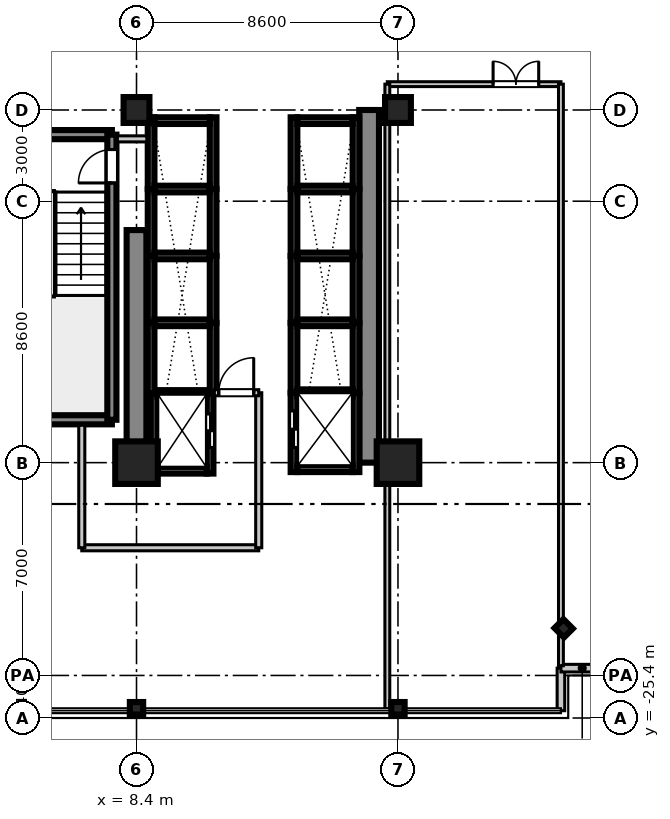
"""IFC4 building model, lengths in metres.
Left out: names, types, materials, properties, quantities, classifications, styles, units other than length and angle.
Written with IfcOpenShell. Run it as: python <this file> out.ifc"""

import sys

from ifc_helpers import new_model, si_unit, direction, frame, frame_2d, origin, origin_2d, place, context, subcontext, project, spatial, rectangle, i_section, extrude, source, transform, mapped, element, fill, save


model = new_model("IFC4")
c1 = context("Model", 3, precision=1e-05, world=origin(), true_north=direction((0.0, 1.0)))
c2 = subcontext(c1, "Body", "Model", "MODEL_VIEW")
j1 = project(units=[si_unit("LENGTHUNIT", "METRE"), si_unit("PLANEANGLEUNIT", "RADIAN")], contexts=[c1])
p1 = place(None, origin())
s1 = spatial("IfcSite", under=j1, at=p1, CompositionType="ELEMENT")
p2 = place(p1, origin())
s2 = spatial("IfcBuilding", under=s1, at=p2, CompositionType="ELEMENT")
p3 = place(p2, frame((0.0, 0.0, 68.9)))
s3 = spatial("IfcBuildingStorey", under=s2, at=p3, CompositionType="ELEMENT", Elevation=68.9)
m1 = source(origin(), c2, "Body", "SweptSolid", [
    extrude(rectangle(XDim=1.4, YDim=1.4, at=origin_2d()), origin(), (0.0, 0.0, 1.0), 3.605),
])
p4 = place(p3, frame((8.4, -17.0, 0.0), z_axis=(0.0, 0.0, 1.0), x_axis=(1.0, 0.0, 0.0)))
e1 = element("IfcColumn", 1, at=p4, inside=s3, PredefinedType="COLUMN", context=c2, shape_type="MappedRepresentation", body=[
    mapped(m1, transform((0.0, 0.0, 0.0), scale=1.0)),
])
m2 = source(origin(), c2, "Body", "SweptSolid", [
    extrude(rectangle(XDim=0.85, YDim=0.85, at=origin_2d()), origin(), (0.0, 0.0, 1.0), 3.605),
])
p5 = place(p3, frame((8.4, -5.4, 0.0), z_axis=(0.0, 0.0, 1.0), x_axis=(1.0, 0.0, 0.0)))
e2 = element("IfcColumn", 2, at=p5, inside=s3, PredefinedType="PILASTER", context=c2, shape_type="MappedRepresentation", body=[
    mapped(m2, transform((0.0, 0.0, 0.0), scale=1.0)),
])
p6 = place(p3, frame((17.0, -17.0, 0.0), z_axis=(0.0, 0.0, 1.0), x_axis=(1.0, 0.0, 0.0)))
e3 = element("IfcColumn", 3, at=p6, inside=s3, PredefinedType="COLUMN", context=c2, shape_type="MappedRepresentation", body=[
    mapped(m1, transform((0.0, 0.0, 0.0), scale=1.0)),
])
p7 = place(p3, frame((17.0, -5.4, 0.0), z_axis=(0.0, 0.0, 1.0), x_axis=(1.0, 0.0, 0.0)))
e4 = element("IfcColumn", 4, at=p7, inside=s3, PredefinedType="PILASTER", context=c2, shape_type="MappedRepresentation", body=[
    mapped(m2, transform((0.0, 0.0, 0.0), scale=1.0)),
])
m3 = source(origin(), c2, "Body", "SweptSolid", [
    extrude(i_section(OverallWidth=0.412, OverallDepth=0.438, WebThickness=0.023, FlangeThickness=0.036, at=origin_2d()), origin(), (0.0, 0.0, 1.0), 3.605),
])
for number, where, z_axis, x_axis in (
    (5, (8.4, -25.08, 0.0), (0.0, 0.0, 1.0), (0.0, 1.0, 0.0)),
    (6, (17.0, -25.08, 0.0), (0.0, 0.0, 1.0), (0.0, 1.0, 0.0)),
    (7, (22.45, -22.45, 0.0), (0.0, 0.0, 1.0), (0.707, 0.707, 0.0)),
):
    element("IfcColumn", number, at=place(p3, frame(where, z_axis=z_axis, x_axis=x_axis)), inside=s3, PredefinedType="COLUMN", context=c2, shape_type="MappedRepresentation", body=[
        mapped(m3, transform((0.0, 0.0, 0.0), scale=1.0)),
    ])
m4 = source(origin(), c2, "Body", "SweptSolid", [
    extrude(rectangle(XDim=7.65, YDim=0.65, at=frame_2d((3.825, 0.0))), origin(), (0.0, 0.0, 1.0), 3.37),
])
p8 = place(p3, frame((8.4, -17.0, 0.0), z_axis=(0.0, 0.0, 1.0), x_axis=(0.0, 1.0, 0.0)))
e8 = element("IfcWall", 8, at=p8, inside=s3, PredefinedType="SHEAR", context=c2, shape_type="MappedRepresentation", body=[
    mapped(m4, transform((0.0, 0.0, 0.0), scale=1.0)),
])
m5 = source(origin(), c2, "Body", "SweptSolid", [
    extrude(rectangle(XDim=11.6, YDim=0.65, at=frame_2d((5.8, 0.0))), origin(), (0.0, 0.0, 1.0), 3.37),
])
p9 = place(p3, frame((16.05, -17.0, 0.0), z_axis=(0.0, 0.0, 1.0), x_axis=(0.0, 1.0, 0.0)))
e9 = element("IfcWall", 9, at=p9, inside=s3, PredefinedType="SHEAR", context=c2, shape_type="MappedRepresentation", body=[
    mapped(m5, transform((0.0, 0.0, 0.0), scale=1.0)),
])
m6 = source(origin(), c2, "Body", "SweptSolid", [
    extrude(rectangle(XDim=3.98, YDim=0.3, at=frame_2d((1.99, 0.0))), origin(), (0.0, 0.0, 1.0), 3.37),
])
for number, where, z_axis, x_axis in (
    (10, (3.61, -15.59, 0.0), (0.0, 0.0, 1.0), (1.0, 0.0, 0.0)),
    (11, (3.61, -6.21, 0.0), (0.0, 0.0, 1.0), (1.0, 0.0, 0.0)),
):
    element("IfcWall", number, at=place(p3, frame(where, z_axis=z_axis, x_axis=x_axis)), inside=s3, PredefinedType="SHEAR", context=c2, shape_type="MappedRepresentation", body=[
        mapped(m6, transform((0.0, 0.0, 0.0), scale=1.0)),
    ])
m7 = source(origin(), c2, "Body", "SweptSolid", [
    extrude(rectangle(XDim=9.38, YDim=0.3, at=frame_2d((4.69, 0.0))), origin(), (0.0, 0.0, 1.0), 3.37),
])
p10 = place(p3, frame((7.59, -15.59, 0.0), z_axis=(0.0, 0.0, 1.0), x_axis=(0.0, 1.0, 0.0)))
e12 = element("IfcWall", 12, at=p10, inside=s3, PredefinedType="SHEAR", context=c2, shape_type="MappedRepresentation", body=[
    mapped(m7, transform((0.0, 0.0, 0.0), scale=1.0)),
])
p11 = place(p10, frame((7.79, 0.0, 0.0)))
e13 = element("IfcOpeningElement", 13, at=p11, cuts=e12, PredefinedType="OPENING", context=c2, shape_type="SweptSolid", body=[
    extrude(rectangle(XDim=1.1, YDim=2.15, at=frame_2d((0.55, 1.075))), frame((0.0, 0.16, 0.0), z_axis=(0.0, -1.0, 0.0), x_axis=(1.0, 0.0, 0.0)), (0.0, 0.0, 1.0), 0.32),
])
m8 = source(origin(), c2, "Body", "SweptSolid", [
    extrude(rectangle(XDim=2.36, YDim=0.22, at=frame_2d((1.18, 0.0))), origin(), (0.0, 0.0, 1.0), 3.37),
])
for number, where, z_axis, x_axis in (
    (14, (13.58, -8.0, 0.0), (0.0, 0.0, 1.0), (0.0, 1.0, 0.0)),
    (15, (15.62, -8.0, 0.0), (0.0, 0.0, 1.0), (0.0, 1.0, 0.0)),
):
    element("IfcWall", number, at=place(p3, frame(where, z_axis=z_axis, x_axis=x_axis)), inside=s3, PredefinedType="SHEAR", context=c2, shape_type="MappedRepresentation", body=[
        mapped(m8, transform((0.0, 0.0, 0.0), scale=1.0)),
    ])
m9 = source(origin(), c2, "Body", "SweptSolid", [
    extrude(rectangle(XDim=1.82, YDim=0.22, at=frame_2d((0.91, 0.0))), origin(), (0.0, 0.0, 1.0), 3.37),
])
p12 = place(p3, frame((13.69, -5.75, 0.0), z_axis=(0.0, 0.0, 1.0), x_axis=(1.0, 0.0, 0.0)))
e16 = element("IfcWall", 16, at=p12, inside=s3, PredefinedType="SHEAR", context=c2, shape_type="MappedRepresentation", body=[
    mapped(m9, transform((0.0, 0.0, 0.0), scale=1.0)),
])
m10 = source(origin(), c2, "Body", "SweptSolid", [
    extrude(rectangle(XDim=2.2, YDim=0.22, at=frame_2d((1.1, 0.0))), origin(), (0.0, 0.0, 1.0), 3.37),
])
for number, where, z_axis, x_axis in (
    (17, (13.58, -10.2, 0.0), (0.0, 0.0, 1.0), (0.0, 1.0, 0.0)),
    (18, (15.62, -10.2, 0.0), (0.0, 0.0, 1.0), (0.0, 1.0, 0.0)),
):
    element("IfcWall", number, at=place(p3, frame(where, z_axis=z_axis, x_axis=x_axis)), inside=s3, PredefinedType="SHEAR", context=c2, shape_type="MappedRepresentation", body=[
        mapped(m10, transform((0.0, 0.0, 0.0), scale=1.0)),
    ])
m11 = source(origin(), c2, "Body", "SweptSolid", [
    extrude(rectangle(XDim=1.82, YDim=0.22, at=frame_2d((0.91, 0.0))), origin(), (0.0, 0.0, 1.0), 3.65),
])
p13 = place(p3, frame((13.69, -8.0, 0.0), z_axis=(0.0, 0.0, 1.0), x_axis=(1.0, 0.0, 0.0)))
e19 = element("IfcWall", 19, at=p13, inside=s3, PredefinedType="SHEAR", context=c2, shape_type="MappedRepresentation", body=[
    mapped(m11, transform((0.0, 0.0, 0.0), scale=1.0)),
])
for number, where, z_axis, x_axis in (
    (20, (13.58, -12.4, 0.0), (0.0, 0.0, 1.0), (0.0, 1.0, 0.0)),
    (21, (15.62, -12.4, 0.0), (0.0, 0.0, 1.0), (0.0, 1.0, 0.0)),
):
    element("IfcWall", number, at=place(p3, frame(where, z_axis=z_axis, x_axis=x_axis)), inside=s3, PredefinedType="SHEAR", context=c2, shape_type="MappedRepresentation", body=[
        mapped(m10, transform((0.0, 0.0, 0.0), scale=1.0)),
    ])
p14 = place(p3, frame((13.69, -10.2, 0.0), z_axis=(0.0, 0.0, 1.0), x_axis=(1.0, 0.0, 0.0)))
e22 = element("IfcWall", 22, at=p14, inside=s3, PredefinedType="SHEAR", context=c2, shape_type="MappedRepresentation", body=[
    mapped(m11, transform((0.0, 0.0, 0.0), scale=1.0)),
])
m12 = source(origin(), c2, "Body", "SweptSolid", [
    extrude(rectangle(XDim=2.3, YDim=0.22, at=frame_2d((1.15, 0.0))), origin(), (0.0, 0.0, 1.0), 3.37),
])
for number, where, z_axis, x_axis in (
    (23, (13.58, -14.7, 0.0), (0.0, 0.0, 1.0), (0.0, 1.0, 0.0)),
    (24, (15.62, -14.7, 0.0), (0.0, 0.0, 1.0), (0.0, 1.0, 0.0)),
):
    element("IfcWall", number, at=place(p3, frame(where, z_axis=z_axis, x_axis=x_axis)), inside=s3, PredefinedType="SHEAR", context=c2, shape_type="MappedRepresentation", body=[
        mapped(m12, transform((0.0, 0.0, 0.0), scale=1.0)),
    ])
p15 = place(p3, frame((13.69, -12.4, 0.0), z_axis=(0.0, 0.0, 1.0), x_axis=(1.0, 0.0, 0.0)))
e25 = element("IfcWall", 25, at=p15, inside=s3, PredefinedType="SHEAR", context=c2, shape_type="MappedRepresentation", body=[
    mapped(m11, transform((0.0, 0.0, 0.0), scale=1.0)),
])
for number, where, z_axis, x_axis in (
    (26, (8.88, -8.0, 0.0), (0.0, 0.0, 1.0), (0.0, 1.0, 0.0)),
    (27, (10.92, -8.0, 0.0), (0.0, 0.0, 1.0), (0.0, 1.0, 0.0)),
):
    element("IfcWall", number, at=place(p3, frame(where, z_axis=z_axis, x_axis=x_axis)), inside=s3, PredefinedType="SHEAR", context=c2, shape_type="MappedRepresentation", body=[
        mapped(m8, transform((0.0, 0.0, 0.0), scale=1.0)),
    ])
p16 = place(p3, frame((8.99, -5.75, 0.0), z_axis=(0.0, 0.0, 1.0), x_axis=(1.0, 0.0, 0.0)))
e28 = element("IfcWall", 28, at=p16, inside=s3, PredefinedType="SHEAR", context=c2, shape_type="MappedRepresentation", body=[
    mapped(m9, transform((0.0, 0.0, 0.0), scale=1.0)),
])
for number, where, z_axis, x_axis in (
    (29, (8.88, -10.2, 0.0), (0.0, 0.0, 1.0), (0.0, 1.0, 0.0)),
    (30, (10.92, -10.2, 0.0), (0.0, 0.0, 1.0), (0.0, 1.0, 0.0)),
):
    element("IfcWall", number, at=place(p3, frame(where, z_axis=z_axis, x_axis=x_axis)), inside=s3, PredefinedType="SHEAR", context=c2, shape_type="MappedRepresentation", body=[
        mapped(m10, transform((0.0, 0.0, 0.0), scale=1.0)),
    ])
p17 = place(p3, frame((8.99, -8.0, 0.0), z_axis=(0.0, 0.0, 1.0), x_axis=(1.0, 0.0, 0.0)))
e31 = element("IfcWall", 31, at=p17, inside=s3, PredefinedType="SHEAR", context=c2, shape_type="MappedRepresentation", body=[
    mapped(m11, transform((0.0, 0.0, 0.0), scale=1.0)),
])
for number, where, z_axis, x_axis in (
    (32, (8.88, -12.4, 0.0), (0.0, 0.0, 1.0), (0.0, 1.0, 0.0)),
    (33, (10.92, -12.4, 0.0), (0.0, 0.0, 1.0), (0.0, 1.0, 0.0)),
):
    element("IfcWall", number, at=place(p3, frame(where, z_axis=z_axis, x_axis=x_axis)), inside=s3, PredefinedType="SHEAR", context=c2, shape_type="MappedRepresentation", body=[
        mapped(m10, transform((0.0, 0.0, 0.0), scale=1.0)),
    ])
p18 = place(p3, frame((8.99, -10.2, 0.0), z_axis=(0.0, 0.0, 1.0), x_axis=(1.0, 0.0, 0.0)))
e34 = element("IfcWall", 34, at=p18, inside=s3, PredefinedType="SHEAR", context=c2, shape_type="MappedRepresentation", body=[
    mapped(m11, transform((0.0, 0.0, 0.0), scale=1.0)),
])
m13 = source(origin(), c2, "Body", "SweptSolid", [
    extrude(rectangle(XDim=2.325, YDim=0.22, at=frame_2d((1.163, 0.0))), origin(), (0.0, 0.0, 1.0), 3.37),
])
for number, where, z_axis, x_axis in (
    (35, (8.88, -14.725, 0.0), (0.0, 0.0, 1.0), (0.0, 1.0, 0.0)),
    (36, (10.92, -14.725, 0.0), (0.0, 0.0, 1.0), (0.0, 1.0, 0.0)),
):
    element("IfcWall", number, at=place(p3, frame(where, z_axis=z_axis, x_axis=x_axis)), inside=s3, PredefinedType="SHEAR", context=c2, shape_type="MappedRepresentation", body=[
        mapped(m13, transform((0.0, 0.0, 0.0), scale=1.0)),
    ])
p19 = place(p3, frame((8.99, -12.4, 0.0), z_axis=(0.0, 0.0, 1.0), x_axis=(1.0, 0.0, 0.0)))
e37 = element("IfcWall", 37, at=p19, inside=s3, PredefinedType="SHEAR", context=c2, shape_type="MappedRepresentation", body=[
    mapped(m11, transform((0.0, 0.0, 0.0), scale=1.0)),
])
m14 = source(origin(), c2, "Body", "SweptSolid", [
    extrude(rectangle(XDim=2.635, YDim=0.22, at=frame_2d((1.317, 0.0))), origin(), (0.0, 0.0, 1.0), 3.37),
])
p20 = place(p3, frame((8.98, -17.36, 0.0), z_axis=(0.0, 0.0, 1.0), x_axis=(0.0, 1.0, 0.0)))
e38 = element("IfcWall", 38, at=p20, inside=s3, PredefinedType="SHEAR", context=c2, shape_type="MappedRepresentation", body=[
    mapped(m14, transform((0.0, 0.0, 0.0), scale=1.0)),
])
p21 = place(p3, frame((10.82, -17.36, 0.0), z_axis=(0.0, 0.0, 1.0), x_axis=(0.0, 1.0, 0.0)))
e39 = element("IfcWall", 39, at=p21, inside=s3, PredefinedType="SHEAR", context=c2, shape_type="MappedRepresentation", body=[
    mapped(m14, transform((0.0, 0.0, 0.0), scale=1.0)),
])
p22 = place(p21, frame((0.86, 0.0, 0.0)))
e40 = element("IfcOpeningElement", 40, at=p22, cuts=e39, PredefinedType="OPENING", context=c2, shape_type="SweptSolid", body=[
    extrude(rectangle(XDim=1.1, YDim=2.2, at=frame_2d((0.55, 1.1))), frame((0.0, 0.12, 0.0), z_axis=(0.0, -1.0, 0.0), x_axis=(1.0, 0.0, 0.0)), (0.0, 0.0, 1.0), 0.24),
])
m15 = source(origin(), c2, "Body", "SweptSolid", [
    extrude(rectangle(XDim=1.62, YDim=0.22, at=frame_2d((0.81, 0.0))), origin(), (0.0, 0.0, 1.0), 3.37),
])
p23 = place(p3, frame((9.09, -17.25, 0.0), z_axis=(0.0, 0.0, 1.0), x_axis=(1.0, 0.0, 0.0)))
e41 = element("IfcWall", 41, at=p23, inside=s3, PredefinedType="SHEAR", context=c2, shape_type="MappedRepresentation", body=[
    mapped(m15, transform((0.0, 0.0, 0.0), scale=1.0)),
])
m16 = source(origin(), c2, "Body", "SweptSolid", [
    extrude(rectangle(XDim=1.62, YDim=0.22, at=frame_2d((0.81, 0.0))), origin(), (0.0, 0.0, 1.0), 3.65),
])
p24 = place(p3, frame((9.09, -14.725, 0.0), z_axis=(0.0, 0.0, 1.0), x_axis=(1.0, 0.0, 0.0)))
e42 = element("IfcWall", 42, at=p24, inside=s3, PredefinedType="SHEAR", context=c2, shape_type="MappedRepresentation", body=[
    mapped(m16, transform((0.0, 0.0, 0.0), scale=1.0)),
])
m17 = source(origin(), c2, "Body", "SweptSolid", [
    extrude(rectangle(XDim=2.61, YDim=0.22, at=frame_2d((1.305, 0.0))), origin(), (0.0, 0.0, 1.0), 3.37),
])
p25 = place(p3, frame((13.58, -17.31, 0.0), z_axis=(0.0, 0.0, 1.0), x_axis=(0.0, 1.0, 0.0)))
e43 = element("IfcWall", 43, at=p25, inside=s3, PredefinedType="SHEAR", context=c2, shape_type="MappedRepresentation", body=[
    mapped(m17, transform((0.0, 0.0, 0.0), scale=1.0)),
])
p26 = place(p25, frame((0.81, 0.0, 0.0)))
e44 = element("IfcOpeningElement", 44, at=p26, cuts=e43, PredefinedType="OPENING", context=c2, shape_type="SweptSolid", body=[
    extrude(rectangle(XDim=1.2, YDim=2.2, at=frame_2d((0.6, 1.1))), frame((0.0, 0.12, 0.0), z_axis=(0.0, -1.0, 0.0), x_axis=(1.0, 0.0, 0.0)), (0.0, 0.0, 1.0), 0.24),
])
p27 = place(p3, frame((15.62, -17.31, 0.0), z_axis=(0.0, 0.0, 1.0), x_axis=(0.0, 1.0, 0.0)))
e45 = element("IfcWall", 45, at=p27, inside=s3, PredefinedType="SHEAR", context=c2, shape_type="MappedRepresentation", body=[
    mapped(m17, transform((0.0, 0.0, 0.0), scale=1.0)),
])
p28 = place(p3, frame((13.69, -17.2, 0.0), z_axis=(0.0, 0.0, 1.0), x_axis=(1.0, 0.0, 0.0)))
e46 = element("IfcWall", 46, at=p28, inside=s3, PredefinedType="SHEAR", context=c2, shape_type="MappedRepresentation", body=[
    mapped(m9, transform((0.0, 0.0, 0.0), scale=1.0)),
])
p29 = place(p3, frame((13.69, -14.7, 0.0), z_axis=(0.0, 0.0, 1.0), x_axis=(1.0, 0.0, 0.0)))
e47 = element("IfcWall", 47, at=p29, inside=s3, PredefinedType="SHEAR", context=c2, shape_type="MappedRepresentation", body=[
    mapped(m11, transform((0.0, 0.0, 0.0), scale=1.0)),
])
m18 = source(origin(), c2, "Body", "SweptSolid", [
    extrude(rectangle(XDim=1.4, YDim=0.25, at=frame_2d((0.7, 0.0))), origin(), (0.0, 0.0, 1.0), 3.37),
])
for number, where, z_axis, x_axis in (
    (48, (22.36, -25.16, 0.0), (0.0, 0.0, 1.0), (0.0, 1.0, 0.0)),
    (49, (22.36, -23.76, 0.0), (0.0, 0.0, 1.0), (1.0, 0.0, 0.0)),
):
    element("IfcWall", number, at=place(p3, frame(where, z_axis=z_axis, x_axis=x_axis)), inside=s3, PredefinedType="STANDARD", context=c2, shape_type="MappedRepresentation", body=[
        mapped(m18, transform((0.0, 0.0, 0.0), scale=1.0)),
    ])
m19 = source(origin(), c2, "Body", "SweptSolid", [
    extrude(rectangle(XDim=5.82, YDim=0.2, at=frame_2d((2.91, 0.0))), origin(), (0.0, 0.0, 1.0), 2.71),
])
p30 = place(p3, frame((6.6, -19.8, 0.0), z_axis=(0.0, 0.0, 1.0), x_axis=(1.0, 0.0, 0.0)))
e50 = element("IfcWall", 50, at=p30, inside=s3, PredefinedType="PARTITIONING", context=c2, shape_type="MappedRepresentation", body=[
    mapped(m19, transform((0.0, 0.0, 0.0), scale=1.0)),
])
m20 = source(origin(), c2, "Body", "SweptSolid", [
    extrude(rectangle(XDim=4.03, YDim=0.2, at=frame_2d((2.015, 0.0))), origin(), (0.0, 0.0, 1.0), 2.71),
])
p31 = place(p3, frame((6.6, -19.8, 0.0), z_axis=(0.0, 0.0, 1.0), x_axis=(0.0, 1.0, 0.0)))
e51 = element("IfcWall", 51, at=p31, inside=s3, PredefinedType="PARTITIONING", context=c2, shape_type="MappedRepresentation", body=[
    mapped(m20, transform((0.0, 0.0, 0.0), scale=1.0)),
])
m21 = source(origin(), c2, "Body", "SweptSolid", [
    extrude(rectangle(XDim=5.1, YDim=0.2, at=frame_2d((2.55, 0.0))), origin(), (0.0, 0.0, 1.0), 2.71),
])
p32 = place(p3, frame((12.42, -19.8, 0.0), z_axis=(0.0, 0.0, 1.0), x_axis=(0.0, 1.0, 0.0)))
e52 = element("IfcWall", 52, at=p32, inside=s3, PredefinedType="PARTITIONING", context=c2, shape_type="MappedRepresentation", body=[
    mapped(m21, transform((0.0, 0.0, 0.0), scale=1.0)),
])
m22 = source(origin(), c2, "Body", "SweptSolid", [
    extrude(rectangle(XDim=1.46, YDim=0.2, at=frame_2d((0.73, 0.0))), origin(), (0.0, 0.0, 1.0), 2.71),
])
p33 = place(p3, frame((10.96, -14.7, 0.0), z_axis=(0.0, 0.0, 1.0), x_axis=(1.0, 0.0, 0.0)))
e53 = element("IfcWall", 53, at=p33, inside=s3, PredefinedType="PARTITIONING", context=c2, shape_type="MappedRepresentation", body=[
    mapped(m22, transform((0.0, 0.0, 0.0), scale=1.0)),
])
p34 = place(p33, frame((0.145, 0.0, 0.0)))
e54 = element("IfcOpeningElement", 54, at=p34, cuts=e53, PredefinedType="OPENING", context=c2, shape_type="SweptSolid", body=[
    extrude(rectangle(XDim=1.15, YDim=2.15, at=frame_2d((0.575, 1.075))), frame((0.0, 0.11, 0.0), z_axis=(0.0, -1.0, 0.0), x_axis=(1.0, 0.0, 0.0)), (0.0, 0.0, 1.0), 0.22),
])
m23 = source(origin(), c2, "Body", "SweptSolid", [
    extrude(rectangle(XDim=0.97, YDim=0.2, at=frame_2d((0.485, 0.0))), origin(), (0.0, 0.0, 1.0), 2.71),
])
p35 = place(p3, frame((7.77, -6.35, 0.0), z_axis=(0.0, 0.0, 1.0), x_axis=(1.0, 0.0, 0.0)))
e55 = element("IfcWall", 55, at=p35, inside=s3, PredefinedType="PARTITIONING", context=c2, shape_type="MappedRepresentation", body=[
    mapped(m23, transform((0.0, 0.0, 0.0), scale=1.0)),
])
m24 = source(origin(), c2, "Body", "SweptSolid", [
    extrude(rectangle(XDim=5.71, YDim=0.16, at=frame_2d((2.855, 0.0))), origin(), (0.0, 0.0, 1.0), 2.71),
])
p36 = place(p3, frame((16.65, -4.55, 0.0), z_axis=(0.0, 0.0, 1.0), x_axis=(1.0, 0.0, 0.0)))
e56 = element("IfcWall", 56, at=p36, inside=s3, PredefinedType="PARTITIONING", context=c2, shape_type="MappedRepresentation", body=[
    mapped(m24, transform((0.0, 0.0, 0.0), scale=1.0)),
])
p37 = place(p36, frame((3.479, 0.0, 0.0)))
e57 = element("IfcOpeningElement", 57, at=p37, cuts=e56, PredefinedType="OPENING", context=c2, shape_type="SweptSolid", body=[
    extrude(rectangle(XDim=1.5, YDim=2.15, at=frame_2d((0.75, 1.075))), frame((0.0, 0.09, 0.0), z_axis=(0.0, -1.0, 0.0), x_axis=(1.0, 0.0, 0.0)), (0.0, 0.0, 1.0), 0.18),
])
m25 = source(origin(), c2, "Body", "SweptSolid", [
    extrude(rectangle(XDim=20.55, YDim=0.16, at=frame_2d((10.275, 0.0))), origin(), (0.0, 0.0, 1.0), 2.71),
])
p38 = place(p3, frame((16.65, -25.1, 0.0), z_axis=(0.0, 0.0, 1.0), x_axis=(0.0, 1.0, 0.0)))
e58 = element("IfcWall", 58, at=p38, inside=s3, PredefinedType="PARTITIONING", context=c2, shape_type="MappedRepresentation", body=[
    mapped(m25, transform((0.0, 0.0, 0.0), scale=1.0)),
])
m26 = source(origin(), c2, "Body", "SweptSolid", [
    extrude(rectangle(XDim=19.13, YDim=0.16, at=frame_2d((9.565, 0.0))), origin(), (0.0, 0.0, 1.0), 2.71),
])
p39 = place(p3, frame((22.36, -23.68, 0.0), z_axis=(0.0, 0.0, 1.0), x_axis=(0.0, 1.0, 0.0)))
e59 = element("IfcWall", 59, at=p39, inside=s3, PredefinedType="PARTITIONING", context=c2, shape_type="MappedRepresentation", body=[
    mapped(m26, transform((0.0, 0.0, 0.0), scale=1.0)),
])
m27 = source(origin(), c2, "Body", "SweptSolid", [
    extrude(rectangle(XDim=1.1, YDim=2.15, at=frame_2d((0.55, 1.075))), frame((0.0, 0.025, 0.0), z_axis=(0.0, -1.0, 0.0), x_axis=(1.0, 0.0, 0.0)), (0.0, 0.0, 1.0), 0.05),
])
p40 = place(p11, origin())
e60 = element("IfcDoor", 60, at=p40, inside=s3, OperationType="SINGLE_SWING_LEFT", PredefinedType="DOOR", context=c2, shape_type="MappedRepresentation", body=[
    mapped(m27, transform((0.0, 0.0, 0.0), scale=1.0)),
])
fill(e13, e60)
m28 = source(origin(), c2, "Body", "SweptSolid", [
    extrude(rectangle(XDim=1.1, YDim=2.2, at=frame_2d((0.55, 1.1))), frame((0.0, 0.025, 0.0), z_axis=(0.0, -1.0, 0.0), x_axis=(1.0, 0.0, 0.0)), (0.0, 0.0, 1.0), 0.05),
])
p41 = place(p22, frame((1.1, 0.0, 0.0), z_axis=(0.0, 0.0, 1.0), x_axis=(-1.0, 0.0, 0.0)))
e61 = element("IfcDoor", 61, at=p41, inside=s3, OperationType="DOUBLE_DOOR_SLIDING", PredefinedType="DOOR", context=c2, shape_type="MappedRepresentation", body=[
    mapped(m28, transform((0.0, 0.0, 0.0), scale=1.0)),
])
fill(e40, e61)
m29 = source(origin(), c2, "Body", "SweptSolid", [
    extrude(rectangle(XDim=1.2, YDim=2.2, at=frame_2d((0.6, 1.1))), frame((0.0, 0.025, 0.0), z_axis=(0.0, -1.0, 0.0), x_axis=(1.0, 0.0, 0.0)), (0.0, 0.0, 1.0), 0.05),
])
p42 = place(p26, origin())
e62 = element("IfcDoor", 62, at=p42, inside=s3, OperationType="DOUBLE_DOOR_SLIDING", PredefinedType="DOOR", context=c2, shape_type="MappedRepresentation", body=[
    mapped(m29, transform((0.0, 0.0, 0.0), scale=1.0)),
])
fill(e44, e62)
m30 = source(origin(), c2, "Body", "SweptSolid", [
    extrude(rectangle(XDim=1.15, YDim=2.15, at=frame_2d((0.575, 1.075))), frame((0.0, 0.025, 0.0), z_axis=(0.0, -1.0, 0.0), x_axis=(1.0, 0.0, 0.0)), (0.0, 0.0, 1.0), 0.05),
])
p43 = place(p34, origin())
e63 = element("IfcDoor", 63, at=p43, inside=s3, OperationType="SINGLE_SWING_RIGHT", PredefinedType="DOOR", context=c2, shape_type="MappedRepresentation", body=[
    mapped(m30, transform((0.0, 0.0, 0.0), scale=1.0)),
])
fill(e54, e63)
m31 = source(origin(), c2, "Body", "SweptSolid", [
    extrude(rectangle(XDim=1.5, YDim=2.15, at=frame_2d((0.75, 1.075))), frame((0.0, 0.025, 0.0), z_axis=(0.0, -1.0, 0.0), x_axis=(1.0, 0.0, 0.0)), (0.0, 0.0, 1.0), 0.05),
])
p44 = place(p37, frame((1.5, 0.0, 0.0), z_axis=(0.0, 0.0, 1.0), x_axis=(-1.0, 0.0, 0.0)))
e64 = element("IfcDoor", 64, at=p44, inside=s3, OperationType="DOUBLE_DOOR_SINGLE_SWING", PredefinedType="DOOR", context=c2, shape_type="MappedRepresentation", body=[
    mapped(m31, transform((0.0, 0.0, 0.0), scale=1.0)),
])
fill(e57, e64)
save(model, sys.argv[1])
